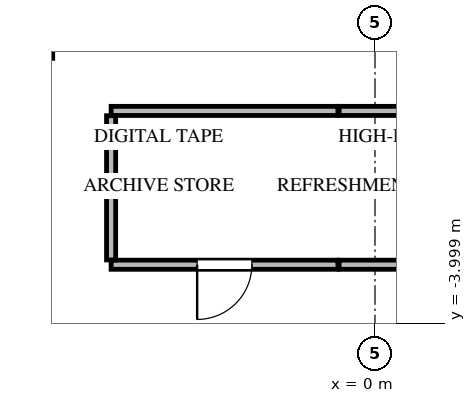
"""IFC4 building model, lengths in metres.
Left out: names, types, materials, properties, quantities, classifications, styles, units other than length and angle.
Written with IfcOpenShell. Run it as: python <this file> out.ifc"""

import sys

from ifc_helpers import new_model, si_unit, direction, frame, frame_2d, origin, place, context, subcontext, project, spatial, rectangle, extrude, source, transform, mapped, element, fill, save


model = new_model("IFC4")
c1 = context("Model", 3, precision=1e-05, world=origin(), true_north=direction((0.0, 1.0)))
c2 = subcontext(c1, "Body", "Model", "MODEL_VIEW")
j1 = project(units=[si_unit("LENGTHUNIT", "METRE"), si_unit("PLANEANGLEUNIT", "RADIAN")], contexts=[c1])
p1 = place(None, origin())
s1 = spatial("IfcSite", under=j1, at=p1, CompositionType="ELEMENT")
p2 = place(p1, origin())
s2 = spatial("IfcBuilding", under=s1, at=p2, CompositionType="ELEMENT")
p3 = place(p2, frame((0.0, 0.0, 244.7)))
s3 = spatial("IfcBuildingStorey", under=s2, at=p3, CompositionType="ELEMENT", Elevation=244.7)
p4 = place(p3, frame((-5.4, 0.354, 0.0), z_axis=(0.0, 0.0, 1.0), x_axis=(0.0, 1.0, 0.0)))
e1 = element("IfcWall", 1, at=p4, inside=s3, PredefinedType="SOLIDWALL", context=c2, shape_type="SweptSolid", body=[
    extrude(rectangle(XDim=4.026, YDim=0.2, at=frame_2d((2.013, 0.0))), origin(), (0.0, 0.0, 1.0), 3.045),
])
p5 = place(p4, frame((0.246, 0.0, 0.0)))
e2 = element("IfcOpeningElement", 2, at=p5, cuts=e1, PredefinedType="OPENING", context=c2, shape_type="SweptSolid", body=[
    extrude(rectangle(XDim=1.0, YDim=2.15, at=frame_2d((0.5, 1.075))), frame((0.0, 0.11, 0.0), z_axis=(0.0, -1.0, 0.0), x_axis=(1.0, 0.0, 0.0)), (0.0, 0.0, 1.0), 0.22),
])
p6 = place(p3, frame((-0.61, -3.04, 0.0), z_axis=(0.0, 0.0, 1.0), x_axis=(-1.0, 0.0, 0.0)))
e3 = element("IfcWall", 3, at=p6, inside=s3, PredefinedType="PARTITIONING", context=c2, shape_type="SweptSolid", body=[
    extrude(rectangle(XDim=3.73, YDim=0.15, at=frame_2d((1.865, 0.0))), origin(), (0.0, 0.0, 1.0), 3.045),
])
p7 = place(p6, frame((1.415, 0.0, 0.0)))
e4 = element("IfcOpeningElement", 4, at=p7, cuts=e3, PredefinedType="OPENING", context=c2, shape_type="SweptSolid", body=[
    extrude(rectangle(XDim=0.9, YDim=2.05, at=frame_2d((0.45, 1.025))), frame((0.0, 0.085, 0.0), z_axis=(0.0, -1.0, 0.0), x_axis=(1.0, 0.0, 0.0)), (0.0, 0.0, 1.0), 0.17),
])
p8 = place(p3, frame((-4.34, -0.51, 0.0), z_axis=(0.0, 0.0, 1.0), x_axis=(1.0, 0.0, 0.0)))
e5 = element("IfcWall", 5, at=p8, inside=s3, PredefinedType="PARTITIONING", context=c2, shape_type="SweptSolid", body=[
    extrude(rectangle(XDim=3.73, YDim=0.15, at=frame_2d((1.865, 0.0))), origin(), (0.0, 0.0, 1.0), 3.045),
])
p9 = place(p3, frame((-4.34, -2.961, 0.0), z_axis=(0.0, 0.0, 1.0), x_axis=(0.0, 1.0, 0.0)))
e6 = element("IfcWall", 6, at=p9, inside=s3, PredefinedType="PARTITIONING", context=c2, shape_type="SweptSolid", body=[
    extrude(rectangle(XDim=2.372, YDim=0.15, at=frame_2d((1.186, 0.0))), origin(), (0.0, 0.0, 1.0), 3.045),
])
p10 = place(p3, frame((3.14, -3.04, 0.0), z_axis=(0.0, 0.0, 1.0), x_axis=(-1.0, 0.0, 0.0)))
e7 = element("IfcWall", 7, at=p10, inside=s3, PredefinedType="PARTITIONING", context=c2, shape_type="SweptSolid", body=[
    extrude(rectangle(XDim=3.73, YDim=0.15, at=frame_2d((1.865, 0.0))), origin(), (0.0, 0.0, 1.0), 3.045),
])
p11 = place(p10, frame((1.415, 0.0, 0.0)))
e8 = element("IfcOpeningElement", 8, at=p11, cuts=e7, PredefinedType="OPENING", context=c2, shape_type="SweptSolid", body=[
    extrude(rectangle(XDim=0.9, YDim=2.05, at=frame_2d((0.45, 1.025))), frame((0.0, 0.085, 0.0), z_axis=(0.0, -1.0, 0.0), x_axis=(1.0, 0.0, 0.0)), (0.0, 0.0, 1.0), 0.17),
])
p12 = place(p3, frame((-0.59, -0.51, 0.0), z_axis=(0.0, 0.0, 1.0), x_axis=(1.0, 0.0, 0.0)))
e9 = element("IfcWall", 9, at=p12, inside=s3, PredefinedType="PARTITIONING", context=c2, shape_type="SweptSolid", body=[
    extrude(rectangle(XDim=3.73, YDim=0.15, at=frame_2d((1.865, 0.0))), origin(), (0.0, 0.0, 1.0), 3.045),
])
m1 = source(origin(), c2, "Body", "SweptSolid", [
    extrude(rectangle(XDim=0.9, YDim=2.05, at=frame_2d((0.45, 1.025))), frame((0.0, 0.025, 0.0), z_axis=(0.0, -1.0, 0.0), x_axis=(1.0, 0.0, 0.0)), (0.0, 0.0, 1.0), 0.05),
])
p13 = place(p7, origin())
e10 = element("IfcDoor", 10, at=p13, inside=s3, OperationType="SINGLE_SWING_RIGHT", PredefinedType="DOOR", context=c2, shape_type="MappedRepresentation", body=[
    mapped(m1, transform((0.0, 0.0, 0.0), x_axis=(1.0, 0.0, 0.0), y_axis=(0.0, 1.0, 0.0), z_axis=(0.0, 0.0, 1.0), scale=1.0)),
])
fill(e4, e10)
save(model, sys.argv[1])
